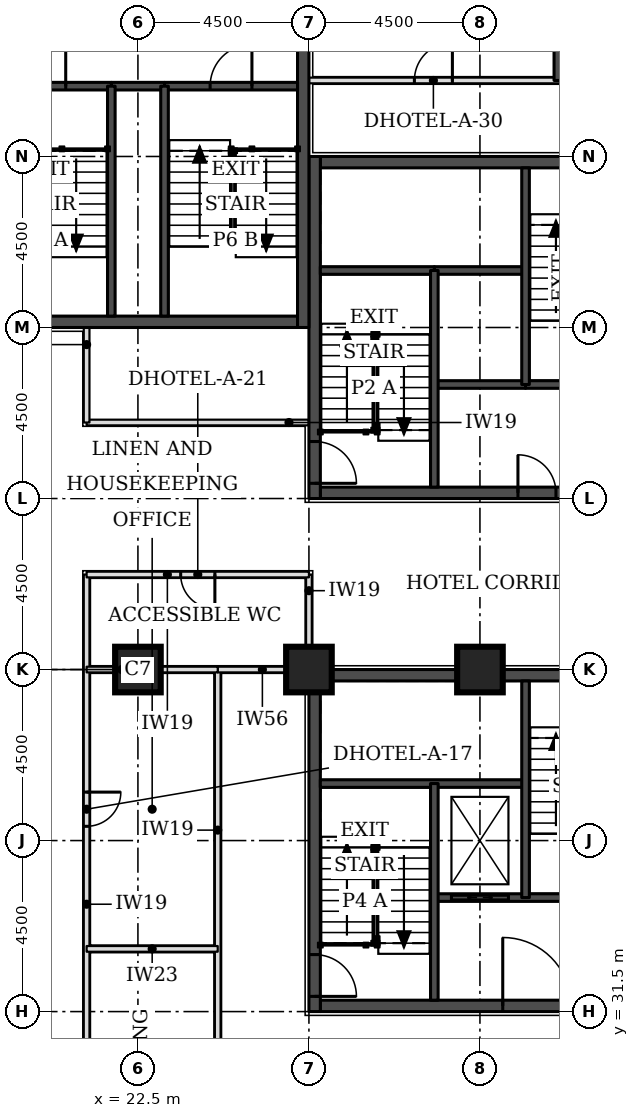
"""IFC4 building model, lengths in metres.
Left out: names, types, materials, properties, quantities, classifications, styles, units other than length and angle.
Written with IfcOpenShell. Run it as: python <this file> out.ifc"""

import sys

from ifc_helpers import new_model, si_unit, direction, frame, frame_2d, origin, origin_2d, place, context, subcontext, project, spatial, rectangle, extrude, element, fill, save


model = new_model("IFC4")
c1 = context("Model", 3, precision=1e-05, world=origin(), true_north=direction((0.0, 1.0)))
c2 = subcontext(c1, "Body", "Model", "MODEL_VIEW")
j1 = project(units=[si_unit("LENGTHUNIT", "METRE"), si_unit("PLANEANGLEUNIT", "RADIAN")], contexts=[c1])
p1 = place(None, origin())
s1 = spatial("IfcSite", under=j1, at=p1, CompositionType="ELEMENT")
p2 = place(p1, origin())
s2 = spatial("IfcBuilding", under=s1, at=p2, CompositionType="ELEMENT")
p3 = place(p2, frame((0.0, 0.0, 49.5)))
s3 = spatial("IfcBuildingStorey", under=s2, at=p3, CompositionType="ELEMENT", Elevation=49.5)
for number, where, z_axis, x_axis in (
    (1, (22.5, 40.5, 0.0), (0.0, 0.0, 1.0), (1.0, 0.0, 0.0)),
    (2, (27.0, 40.5, 0.0), (0.0, 0.0, 1.0), (1.0, 0.0, 0.0)),
    (3, (31.5, 40.5, 0.0), (0.0, 0.0, 1.0), (1.0, 0.0, 0.0)),
):
    element("IfcColumn", number, at=place(p3, frame(where, z_axis=z_axis, x_axis=x_axis)), inside=s3, PredefinedType="COLUMN", context=c2, shape_type="SweptSolid", body=[
        extrude(rectangle(XDim=1.2, YDim=1.2, at=origin_2d()), origin(), (0.0, 0.0, 1.0), 3.3),
    ])
p4 = place(p3, frame((27.3, 45.15, 0.0), z_axis=(0.0, 0.0, 1.0), x_axis=(1.0, 0.0, 0.0)))
e4 = element("IfcWall", 4, at=p4, inside=s3, PredefinedType="SHEAR", context=c2, shape_type="SweptSolid", body=[
    extrude(rectangle(XDim=8.4, YDim=0.3, at=frame_2d((4.2, 0.0))), origin(), (0.0, 0.0, 1.0), 3.3),
])
p5 = place(p4, frame((5.2, 0.0, 0.0)))
e5 = element("IfcOpeningElement", 5, at=p5, cuts=e4, PredefinedType="OPENING", context=c2, shape_type="SweptSolid", body=[
    extrude(rectangle(XDim=1.0, YDim=2.1, at=frame_2d((0.5, 1.05))), frame((0.0, 0.16, 0.0), z_axis=(0.0, -1.0, 0.0), x_axis=(1.0, 0.0, 0.0)), (0.0, 0.0, 1.0), 0.32),
])
p6 = place(p3, frame((27.3, 53.85, 0.0), z_axis=(0.0, 0.0, 1.0), x_axis=(1.0, 0.0, 0.0)))
e6 = element("IfcWall", 6, at=p6, inside=s3, PredefinedType="SHEAR", context=c2, shape_type="SweptSolid", body=[
    extrude(rectangle(XDim=8.4, YDim=0.3, at=frame_2d((4.2, 0.0))), origin(), (0.0, 0.0, 1.0), 3.3),
])
p7 = place(p6, frame((6.4, 0.0, 0.0)))
e7 = element("IfcOpeningElement", 7, at=p7, cuts=e6, PredefinedType="OPENING", context=c2, shape_type="SweptSolid", body=[
    extrude(rectangle(XDim=1.1, YDim=2.1, at=frame_2d((0.55, 1.05))), frame((0.0, 0.16, 0.0), z_axis=(0.0, -1.0, 0.0), x_axis=(1.0, 0.0, 0.0)), (0.0, 0.0, 1.0), 0.32),
])
p8 = place(p3, frame((27.15, 45.0, 0.0), z_axis=(0.0, 0.0, 1.0), x_axis=(0.0, 1.0, 0.0)))
e8 = element("IfcWall", 8, at=p8, inside=s3, PredefinedType="SHEAR", context=c2, shape_type="SweptSolid", body=[
    extrude(rectangle(XDim=9.0, YDim=0.3, at=frame_2d((4.5, 0.0))), origin(), (0.0, 0.0, 1.0), 3.3),
])
p9 = place(p8, frame((0.4, 0.0, 0.0)))
e9 = element("IfcOpeningElement", 9, at=p9, cuts=e8, PredefinedType="OPENING", context=c2, shape_type="SweptSolid", body=[
    extrude(rectangle(XDim=1.1, YDim=2.1, at=frame_2d((0.55, 1.05))), frame((0.0, 0.16, 0.0), z_axis=(0.0, -1.0, 0.0), x_axis=(1.0, 0.0, 0.0)), (0.0, 0.0, 1.0), 0.32),
])
p10 = place(p3, frame((27.3, 31.65, 0.0), z_axis=(0.0, 0.0, 1.0), x_axis=(1.0, 0.0, 0.0)))
e10 = element("IfcWall", 10, at=p10, inside=s3, PredefinedType="SHEAR", context=c2, shape_type="SweptSolid", body=[
    extrude(rectangle(XDim=8.4, YDim=0.3, at=frame_2d((4.2, 0.0))), origin(), (0.0, 0.0, 1.0), 3.3),
])
p11 = place(p10, frame((4.8, 0.0, 0.0)))
e11 = element("IfcOpeningElement", 11, at=p11, cuts=e10, PredefinedType="OPENING", context=c2, shape_type="SweptSolid", body=[
    extrude(rectangle(XDim=1.8, YDim=2.1, at=frame_2d((0.9, 1.05))), frame((0.0, 0.16, 0.0), z_axis=(0.0, -1.0, 0.0), x_axis=(1.0, 0.0, 0.0)), (0.0, 0.0, 1.0), 0.32),
])
p12 = place(p3, frame((27.3, 40.35, 0.0), z_axis=(0.0, 0.0, 1.0), x_axis=(1.0, 0.0, 0.0)))
e12 = element("IfcWall", 12, at=p12, inside=s3, PredefinedType="SHEAR", context=c2, shape_type="SweptSolid", body=[
    extrude(rectangle(XDim=8.4, YDim=0.3, at=frame_2d((4.2, 0.0))), origin(), (0.0, 0.0, 1.0), 3.3),
])
p13 = place(p12, frame((6.4, 0.0, 0.0)))
e13 = element("IfcOpeningElement", 13, at=p13, cuts=e12, PredefinedType="OPENING", context=c2, shape_type="SweptSolid", body=[
    extrude(rectangle(XDim=1.1, YDim=2.1, at=frame_2d((0.55, 1.05))), frame((0.0, 0.16, 0.0), z_axis=(0.0, -1.0, 0.0), x_axis=(1.0, 0.0, 0.0)), (0.0, 0.0, 1.0), 0.32),
])
p14 = place(p3, frame((27.15, 31.5, 0.0), z_axis=(0.0, 0.0, 1.0), x_axis=(0.0, 1.0, 0.0)))
e14 = element("IfcWall", 14, at=p14, inside=s3, PredefinedType="SHEAR", context=c2, shape_type="SweptSolid", body=[
    extrude(rectangle(XDim=9.0, YDim=0.3, at=frame_2d((4.5, 0.0))), origin(), (0.0, 0.0, 1.0), 3.3),
])
p15 = place(p14, frame((0.4, 0.0, 0.0)))
e15 = element("IfcOpeningElement", 15, at=p15, cuts=e14, PredefinedType="OPENING", context=c2, shape_type="SweptSolid", body=[
    extrude(rectangle(XDim=1.1, YDim=2.1, at=frame_2d((0.55, 1.05))), frame((0.0, 0.16, 0.0), z_axis=(0.0, -1.0, 0.0), x_axis=(1.0, 0.0, 0.0)), (0.0, 0.0, 1.0), 0.32),
])
p16 = place(p3, frame((18.3, 49.65, 0.0), z_axis=(0.0, 0.0, 1.0), x_axis=(1.0, 0.0, 0.0)))
e16 = element("IfcWall", 16, at=p16, inside=s3, PredefinedType="SHEAR", context=c2, shape_type="SweptSolid", body=[
    extrude(rectangle(XDim=8.4, YDim=0.3, at=frame_2d((4.2, 0.0))), origin(), (0.0, 0.0, 1.0), 3.3),
])
p17 = place(p3, frame((26.85, 49.5, 0.0), z_axis=(0.0, 0.0, 1.0), x_axis=(0.0, 1.0, 0.0)))
e17 = element("IfcWall", 17, at=p17, inside=s3, PredefinedType="SHEAR", context=c2, shape_type="SweptSolid", body=[
    extrude(rectangle(XDim=9.0, YDim=0.3, at=frame_2d((4.5, 0.0))), origin(), (0.0, 0.0, 1.0), 3.3),
])
p18 = place(p3, frame((21.15, 25.65, 0.0), z_axis=(0.0, 0.0, 1.0), x_axis=(0.0, 1.0, 0.0)))
e18 = element("IfcWall", 18, at=p18, inside=s3, PredefinedType="PARTITIONING", context=c2, shape_type="SweptSolid", body=[
    extrude(rectangle(XDim=17.35, YDim=0.15, at=frame_2d((8.675, 0.0))), origin(), (0.0, 0.0, 1.0), 3.08),
])
p19 = place(p18, frame((3.3, 0.0, 0.0)))
e19 = element("IfcOpeningElement", 19, at=p19, cuts=e18, PredefinedType="OPENING", context=c2, shape_type="SweptSolid", body=[
    extrude(rectangle(XDim=0.9, YDim=2.1, at=frame_2d((0.45, 1.05))), frame((0.0, 0.085, 0.0), z_axis=(0.0, -1.0, 0.0), x_axis=(1.0, 0.0, 0.0)), (0.0, 0.0, 1.0), 0.17),
])
p20 = place(p18, frame((10.725, 0.0, 0.0)))
e20 = element("IfcOpeningElement", 20, at=p20, cuts=e18, PredefinedType="OPENING", context=c2, shape_type="SweptSolid", body=[
    extrude(rectangle(XDim=0.9, YDim=2.1, at=frame_2d((0.45, 1.05))), frame((0.0, 0.085, 0.0), z_axis=(0.0, -1.0, 0.0), x_axis=(1.0, 0.0, 0.0)), (0.0, 0.0, 1.0), 0.17),
])
p21 = place(p3, frame((24.6, 25.65, 0.0), z_axis=(0.0, 0.0, 1.0), x_axis=(0.0, 1.0, 0.0)))
e21 = element("IfcWall", 21, at=p21, inside=s3, PredefinedType="PARTITIONING", context=c2, shape_type="SweptSolid", body=[
    extrude(rectangle(XDim=14.85, YDim=0.15, at=frame_2d((7.425, 0.0))), origin(), (0.0, 0.0, 1.0), 3.08),
])
p22 = place(p3, frame((24.6, 40.5, 0.0), z_axis=(0.0, 0.0, 1.0), x_axis=(1.0, 0.0, 0.0)))
e22 = element("IfcWall", 22, at=p22, inside=s3, PredefinedType="PARTITIONING", context=c2, shape_type="SweptSolid", body=[
    extrude(rectangle(XDim=2.35, YDim=0.15, at=frame_2d((1.175, 0.0))), origin(), (0.0, 0.0, 1.0), 2.33),
])
p23 = place(p3, frame((27.0, 40.55, 0.0), z_axis=(0.0, 0.0, 1.0), x_axis=(0.0, 1.0, 0.0)))
e23 = element("IfcWall", 23, at=p23, inside=s3, PredefinedType="PARTITIONING", context=c2, shape_type="SweptSolid", body=[
    extrude(rectangle(XDim=2.45, YDim=0.15, at=frame_2d((1.225, 0.0))), origin(), (0.0, 0.0, 1.0), 3.08),
])
p24 = place(p3, frame((21.15, 43.0, 0.0), z_axis=(0.0, 0.0, 1.0), x_axis=(1.0, 0.0, 0.0)))
e24 = element("IfcWall", 24, at=p24, inside=s3, PredefinedType="PARTITIONING", context=c2, shape_type="SweptSolid", body=[
    extrude(rectangle(XDim=5.85, YDim=0.15, at=frame_2d((2.925, 0.0))), origin(), (0.0, 0.0, 1.0), 3.08),
])
p25 = place(p24, frame((2.475, 0.0, 0.0)))
e25 = element("IfcOpeningElement", 25, at=p25, cuts=e24, PredefinedType="OPENING", context=c2, shape_type="SweptSolid", body=[
    extrude(rectangle(XDim=0.9, YDim=2.1, at=frame_2d((0.45, 1.05))), frame((0.0, 0.085, 0.0), z_axis=(0.0, -1.0, 0.0), x_axis=(1.0, 0.0, 0.0)), (0.0, 0.0, 1.0), 0.17),
])
p26 = place(p3, frame((21.15, 47.0, 0.0), z_axis=(0.0, 0.0, 1.0), x_axis=(1.0, 0.0, 0.0)))
e26 = element("IfcWall", 26, at=p26, inside=s3, PredefinedType="PARTITIONING", context=c2, shape_type="SweptSolid", body=[
    extrude(rectangle(XDim=5.85, YDim=0.15, at=frame_2d((2.925, 0.0))), origin(), (0.0, 0.0, 1.0), 3.08),
])
p27 = place(p3, frame((21.15, 47.0, 0.0), z_axis=(0.0, 0.0, 1.0), x_axis=(0.0, 1.0, 0.0)))
e27 = element("IfcWall", 27, at=p27, inside=s3, PredefinedType="PARTITIONING", context=c2, shape_type="SweptSolid", body=[
    extrude(rectangle(XDim=2.5, YDim=0.15, at=frame_2d((1.25, 0.0))), origin(), (0.0, 0.0, 1.0), 3.08),
])
p28 = place(p3, frame((27.0, 56.0, 0.0), z_axis=(0.0, 0.0, 1.0), x_axis=(1.0, 0.0, 0.0)))
e28 = element("IfcWall", 28, at=p28, inside=s3, PredefinedType="PARTITIONING", context=c2, shape_type="SweptSolid", body=[
    extrude(rectangle(XDim=16.0, YDim=0.15, at=frame_2d((8.0, 0.0))), origin(), (0.0, 0.0, 1.0), 3.08),
])
p29 = place(p28, frame((2.775, 0.0, 0.0)))
e29 = element("IfcOpeningElement", 29, at=p29, cuts=e28, PredefinedType="OPENING", context=c2, shape_type="SweptSolid", body=[
    extrude(rectangle(XDim=1.0, YDim=2.1, at=frame_2d((0.5, 1.05))), frame((0.0, 0.085, 0.0), z_axis=(0.0, -1.0, 0.0), x_axis=(1.0, 0.0, 0.0)), (0.0, 0.0, 1.0), 0.17),
])
p30 = place(p3, frame((33.55, 56.0, 0.0), z_axis=(0.0, 0.0, 1.0), x_axis=(0.0, 1.0, 0.0)))
e30 = element("IfcWall", 30, at=p30, inside=s3, PredefinedType="SOLIDWALL", context=c2, shape_type="SweptSolid", body=[
    extrude(rectangle(XDim=2.85, YDim=0.2, at=frame_2d((1.425, 0.0))), origin(), (0.0, 0.0, 1.0), 3.08),
])
p31 = place(p30, frame((1.0, 0.0, 0.0)))
e31 = element("IfcOpeningElement", 31, at=p31, cuts=e30, PredefinedType="OPENING", context=c2, shape_type="SweptSolid", body=[
    extrude(rectangle(XDim=0.85, YDim=2.1, at=frame_2d((0.425, 1.05))), frame((0.0, 0.11, 0.0), z_axis=(0.0, -1.0, 0.0), x_axis=(1.0, 0.0, 0.0)), (0.0, 0.0, 1.0), 0.22),
])
p32 = place(p3, frame((21.15, 33.15, 0.0), z_axis=(0.0, 0.0, 1.0), x_axis=(1.0, 0.0, 0.0)))
e32 = element("IfcWall", 32, at=p32, inside=s3, PredefinedType="PARTITIONING", context=c2, shape_type="SweptSolid", body=[
    extrude(rectangle(XDim=3.45, YDim=0.15, at=frame_2d((1.725, 0.0))), origin(), (0.0, 0.0, 1.0), 3.08),
])
p33 = place(p3, frame((21.15, 40.5, 0.0), z_axis=(0.0, 0.0, 1.0), x_axis=(1.0, 0.0, 0.0)))
e33 = element("IfcWall", 33, at=p33, inside=s3, PredefinedType="PARTITIONING", context=c2, shape_type="SweptSolid", body=[
    extrude(rectangle(XDim=3.45, YDim=0.15, at=frame_2d((1.725, 0.0))), origin(), (0.0, 0.0, 1.0), 2.33),
])
p34 = place(p3, frame((30.3, 48.0, 0.0), z_axis=(0.0, 0.0, 1.0), x_axis=(1.0, 0.0, 0.0)))
e34 = element("IfcWall", 34, at=p34, inside=s3, PredefinedType="SOLIDWALL", context=c2, shape_type="SweptSolid", body=[
    extrude(rectangle(XDim=2.4, YDim=0.2, at=frame_2d((1.2, 0.0))), origin(), (0.0, 0.0, 1.0), 3.08),
])
p35 = place(p3, frame((32.7, 48.0, 0.0), z_axis=(0.0, 0.0, 1.0), x_axis=(1.0, 0.0, 0.0)))
e35 = element("IfcWall", 35, at=p35, inside=s3, PredefinedType="SOLIDWALL", context=c2, shape_type="SweptSolid", body=[
    extrude(rectangle(XDim=3.0, YDim=0.2, at=frame_2d((1.5, 0.0))), origin(), (0.0, 0.0, 1.0), 3.08),
])
p36 = place(p3, frame((30.3, 51.0, 0.0), z_axis=(0.0, 0.0, 1.0), x_axis=(1.0, 0.0, 0.0)))
e36 = element("IfcWall", 36, at=p36, inside=s3, PredefinedType="SOLIDWALL", context=c2, shape_type="SweptSolid", body=[
    extrude(rectangle(XDim=2.4, YDim=0.2, at=frame_2d((1.2, 0.0))), origin(), (0.0, 0.0, 1.0), 3.3),
])
p37 = place(p3, frame((27.3, 51.0, 0.0), z_axis=(0.0, 0.0, 1.0), x_axis=(1.0, 0.0, 0.0)))
e37 = element("IfcWall", 37, at=p37, inside=s3, PredefinedType="SOLIDWALL", context=c2, shape_type="SweptSolid", body=[
    extrude(rectangle(XDim=3.0, YDim=0.2, at=frame_2d((1.5, 0.0))), origin(), (0.0, 0.0, 1.0), 3.08),
])
for number, where, z_axis, x_axis in (
    (38, (30.3, 45.3, 0.0), (0.0, 0.0, 1.0), (0.0, 1.0, 0.0)),
    (39, (32.7, 48.0, 0.0), (0.0, 0.0, 1.0), (0.0, 1.0, 0.0)),
):
    element("IfcWall", number, at=place(p3, frame(where, z_axis=z_axis, x_axis=x_axis)), inside=s3, PredefinedType="SOLIDWALL", context=c2, shape_type="SweptSolid", body=[
        extrude(rectangle(XDim=5.7, YDim=0.2, at=frame_2d((2.85, 0.0))), origin(), (0.0, 0.0, 1.0), 3.08),
    ])
p38 = place(p3, frame((30.3, 34.5, 0.0), z_axis=(0.0, 0.0, 1.0), x_axis=(1.0, 0.0, 0.0)))
e40 = element("IfcWall", 40, at=p38, inside=s3, PredefinedType="SOLIDWALL", context=c2, shape_type="SweptSolid", body=[
    extrude(rectangle(XDim=5.4, YDim=0.2, at=frame_2d((2.7, 0.0))), origin(), (0.0, 0.0, 1.0), 3.08),
])
p39 = place(p38, frame((0.45, 0.0, 0.0)))
e41 = element("IfcOpeningElement", 41, at=p39, cuts=e40, PredefinedType="OPENING", context=c2, shape_type="SweptSolid", body=[
    extrude(rectangle(XDim=1.5, YDim=2.1, at=frame_2d((0.75, 1.05))), frame((0.0, 0.11, 0.0), z_axis=(0.0, -1.0, 0.0), x_axis=(1.0, 0.0, 0.0)), (0.0, 0.0, 1.0), 0.22),
])
p40 = place(p3, frame((27.3, 37.5, 0.0), z_axis=(0.0, 0.0, 1.0), x_axis=(1.0, 0.0, 0.0)))
e42 = element("IfcWall", 42, at=p40, inside=s3, PredefinedType="SOLIDWALL", context=c2, shape_type="SweptSolid", body=[
    extrude(rectangle(XDim=5.4, YDim=0.2, at=frame_2d((2.7, 0.0))), origin(), (0.0, 0.0, 1.0), 3.08),
])
for number, where, z_axis, x_axis in (
    (43, (30.3, 31.8, 0.0), (0.0, 0.0, 1.0), (0.0, 1.0, 0.0)),
    (44, (32.7, 34.5, 0.0), (0.0, 0.0, 1.0), (0.0, 1.0, 0.0)),
):
    element("IfcWall", number, at=place(p3, frame(where, z_axis=z_axis, x_axis=x_axis)), inside=s3, PredefinedType="SOLIDWALL", context=c2, shape_type="SweptSolid", body=[
        extrude(rectangle(XDim=5.7, YDim=0.2, at=frame_2d((2.85, 0.0))), origin(), (0.0, 0.0, 1.0), 3.08),
    ])
p41 = place(p3, frame((21.8, 55.85, 0.0), z_axis=(0.0, 0.0, 1.0), x_axis=(1.0, 0.0, 0.0)))
e45 = element("IfcWall", 45, at=p41, inside=s3, PredefinedType="SOLIDWALL", context=c2, shape_type="SweptSolid", body=[
    extrude(rectangle(XDim=1.4, YDim=0.2, at=frame_2d((0.7, 0.0))), origin(), (0.0, 0.0, 1.0), 3.08),
])
p42 = place(p3, frame((18.3, 55.85, 0.0), z_axis=(0.0, 0.0, 1.0), x_axis=(1.0, 0.0, 0.0)))
e46 = element("IfcWall", 46, at=p42, inside=s3, PredefinedType="SOLIDWALL", context=c2, shape_type="SweptSolid", body=[
    extrude(rectangle(XDim=3.5, YDim=0.2, at=frame_2d((1.75, 0.0))), origin(), (0.0, 0.0, 1.0), 3.08),
])
p43 = place(p42, frame((1.2, 0.0, 0.0)))
e47 = element("IfcOpeningElement", 47, at=p43, cuts=e46, PredefinedType="OPENING", context=c2, shape_type="SweptSolid", body=[
    extrude(rectangle(XDim=1.1, YDim=2.1, at=frame_2d((0.55, 1.05))), frame((0.0, 0.11, 0.0), z_axis=(0.0, -1.0, 0.0), x_axis=(1.0, 0.0, 0.0)), (0.0, 0.0, 1.0), 0.22),
])
p44 = place(p3, frame((23.2, 55.85, 0.0), z_axis=(0.0, 0.0, 1.0), x_axis=(1.0, 0.0, 0.0)))
e48 = element("IfcWall", 48, at=p44, inside=s3, PredefinedType="SOLIDWALL", context=c2, shape_type="SweptSolid", body=[
    extrude(rectangle(XDim=3.5, YDim=0.2, at=frame_2d((1.75, 0.0))), origin(), (0.0, 0.0, 1.0), 3.08),
])
p45 = place(p44, frame((1.2, 0.0, 0.0)))
e49 = element("IfcOpeningElement", 49, at=p45, cuts=e48, PredefinedType="OPENING", context=c2, shape_type="SweptSolid", body=[
    extrude(rectangle(XDim=1.1, YDim=2.1, at=frame_2d((0.55, 1.05))), frame((0.0, 0.11, 0.0), z_axis=(0.0, -1.0, 0.0), x_axis=(1.0, 0.0, 0.0)), (0.0, 0.0, 1.0), 0.22),
])
for number, where, z_axis, x_axis in (
    (50, (21.8, 49.8, 0.0), (0.0, 0.0, 1.0), (0.0, 1.0, 0.0)),
    (51, (23.2, 49.8, 0.0), (0.0, 0.0, 1.0), (0.0, 1.0, 0.0)),
):
    element("IfcWall", number, at=place(p3, frame(where, z_axis=z_axis, x_axis=x_axis)), inside=s3, PredefinedType="SOLIDWALL", context=c2, shape_type="SweptSolid", body=[
        extrude(rectangle(XDim=6.05, YDim=0.2, at=frame_2d((3.025, 0.0))), origin(), (0.0, 0.0, 1.0), 3.08),
    ])
p46 = place(p29, origin())
e52 = element("IfcDoor", 52, at=p46, inside=s3, OperationType="SINGLE_SWING_RIGHT", PredefinedType="DOOR", context=c2, shape_type="SweptSolid", body=[
    extrude(rectangle(XDim=1.0, YDim=2.1, at=frame_2d((0.5, 1.05))), frame((0.0, 0.025, 0.0), z_axis=(0.0, -1.0, 0.0), x_axis=(1.0, 0.0, 0.0)), (0.0, 0.0, 1.0), 0.05),
])
fill(e29, e52)
p47 = place(p20, frame((0.9, 0.0, 0.0), z_axis=(0.0, 0.0, 1.0), x_axis=(-1.0, 0.0, 0.0)))
e53 = element("IfcDoor", 53, at=p47, inside=s3, OperationType="SINGLE_SWING_LEFT", PredefinedType="DOOR", context=c2, shape_type="SweptSolid", body=[
    extrude(rectangle(XDim=0.9, YDim=2.1, at=frame_2d((0.45, 1.05))), frame((0.0, 0.025, 0.0), z_axis=(0.0, -1.0, 0.0), x_axis=(1.0, 0.0, 0.0)), (0.0, 0.0, 1.0), 0.05),
])
fill(e20, e53)
p48 = place(p25, frame((0.9, 0.0, 0.0), z_axis=(0.0, 0.0, 1.0), x_axis=(-1.0, 0.0, 0.0)))
e54 = element("IfcDoor", 54, at=p48, inside=s3, OperationType="SINGLE_SWING_LEFT", PredefinedType="DOOR", context=c2, shape_type="SweptSolid", body=[
    extrude(rectangle(XDim=0.9, YDim=2.1, at=frame_2d((0.45, 1.05))), frame((0.0, 0.025, 0.0), z_axis=(0.0, -1.0, 0.0), x_axis=(1.0, 0.0, 0.0)), (0.0, 0.0, 1.0), 0.05),
])
fill(e25, e54)
p49 = place(p9, frame((1.1, 0.0, 0.0), z_axis=(0.0, 0.0, 1.0), x_axis=(-1.0, 0.0, 0.0)))
e55 = element("IfcDoor", 55, at=p49, inside=s3, OperationType="SINGLE_SWING_RIGHT", PredefinedType="DOOR", context=c2, shape_type="SweptSolid", body=[
    extrude(rectangle(XDim=1.1, YDim=2.1, at=frame_2d((0.55, 1.05))), frame((0.0, 0.025, 0.0), z_axis=(0.0, -1.0, 0.0), x_axis=(1.0, 0.0, 0.0)), (0.0, 0.0, 1.0), 0.05),
])
fill(e9, e55)
p50 = place(p5, origin())
e56 = element("IfcDoor", 56, at=p50, inside=s3, OperationType="SINGLE_SWING_LEFT", PredefinedType="DOOR", context=c2, shape_type="SweptSolid", body=[
    extrude(rectangle(XDim=1.0, YDim=2.1, at=frame_2d((0.5, 1.05))), frame((0.0, 0.025, 0.0), z_axis=(0.0, -1.0, 0.0), x_axis=(1.0, 0.0, 0.0)), (0.0, 0.0, 1.0), 0.05),
])
fill(e5, e56)
p51 = place(p15, frame((1.1, 0.0, 0.0), z_axis=(0.0, 0.0, 1.0), x_axis=(-1.0, 0.0, 0.0)))
e57 = element("IfcDoor", 57, at=p51, inside=s3, OperationType="SINGLE_SWING_RIGHT", PredefinedType="DOOR", context=c2, shape_type="SweptSolid", body=[
    extrude(rectangle(XDim=1.1, YDim=2.1, at=frame_2d((0.55, 1.05))), frame((0.0, 0.025, 0.0), z_axis=(0.0, -1.0, 0.0), x_axis=(1.0, 0.0, 0.0)), (0.0, 0.0, 1.0), 0.05),
])
fill(e15, e57)
p52 = place(p39, origin())
e58 = element("IfcDoor", 58, at=p52, inside=s3, OperationType="DOUBLE_DOOR_SLIDING", PredefinedType="DOOR", context=c2, shape_type="SweptSolid", body=[
    extrude(rectangle(XDim=1.5, YDim=2.1, at=frame_2d((0.75, 1.05))), frame((0.0, 0.025, 0.0), z_axis=(0.0, -1.0, 0.0), x_axis=(1.0, 0.0, 0.0)), (0.0, 0.0, 1.0), 0.05),
])
fill(e41, e58)
p53 = place(p11, origin())
e59 = element("IfcDoor", 59, at=p53, inside=s3, OperationType="SINGLE_SWING_LEFT", PredefinedType="DOOR", context=c2, shape_type="SweptSolid", body=[
    extrude(rectangle(XDim=1.8, YDim=2.1, at=frame_2d((0.9, 1.05))), frame((0.0, 0.025, 0.0), z_axis=(0.0, -1.0, 0.0), x_axis=(1.0, 0.0, 0.0)), (0.0, 0.0, 1.0), 0.05),
])
fill(e11, e59)
p54 = place(p43, origin())
e60 = element("IfcDoor", 60, at=p54, inside=s3, OperationType="SINGLE_SWING_RIGHT", PredefinedType="DOOR", context=c2, shape_type="SweptSolid", body=[
    extrude(rectangle(XDim=1.1, YDim=2.1, at=frame_2d((0.55, 1.05))), frame((0.0, 0.025, 0.0), z_axis=(0.0, -1.0, 0.0), x_axis=(1.0, 0.0, 0.0)), (0.0, 0.0, 1.0), 0.05),
])
fill(e47, e60)
p55 = place(p45, origin())
e61 = element("IfcDoor", 61, at=p55, inside=s3, OperationType="SINGLE_SWING_RIGHT", PredefinedType="DOOR", context=c2, shape_type="SweptSolid", body=[
    extrude(rectangle(XDim=1.1, YDim=2.1, at=frame_2d((0.55, 1.05))), frame((0.0, 0.025, 0.0), z_axis=(0.0, -1.0, 0.0), x_axis=(1.0, 0.0, 0.0)), (0.0, 0.0, 1.0), 0.05),
])
fill(e49, e61)
save(model, sys.argv[1])
